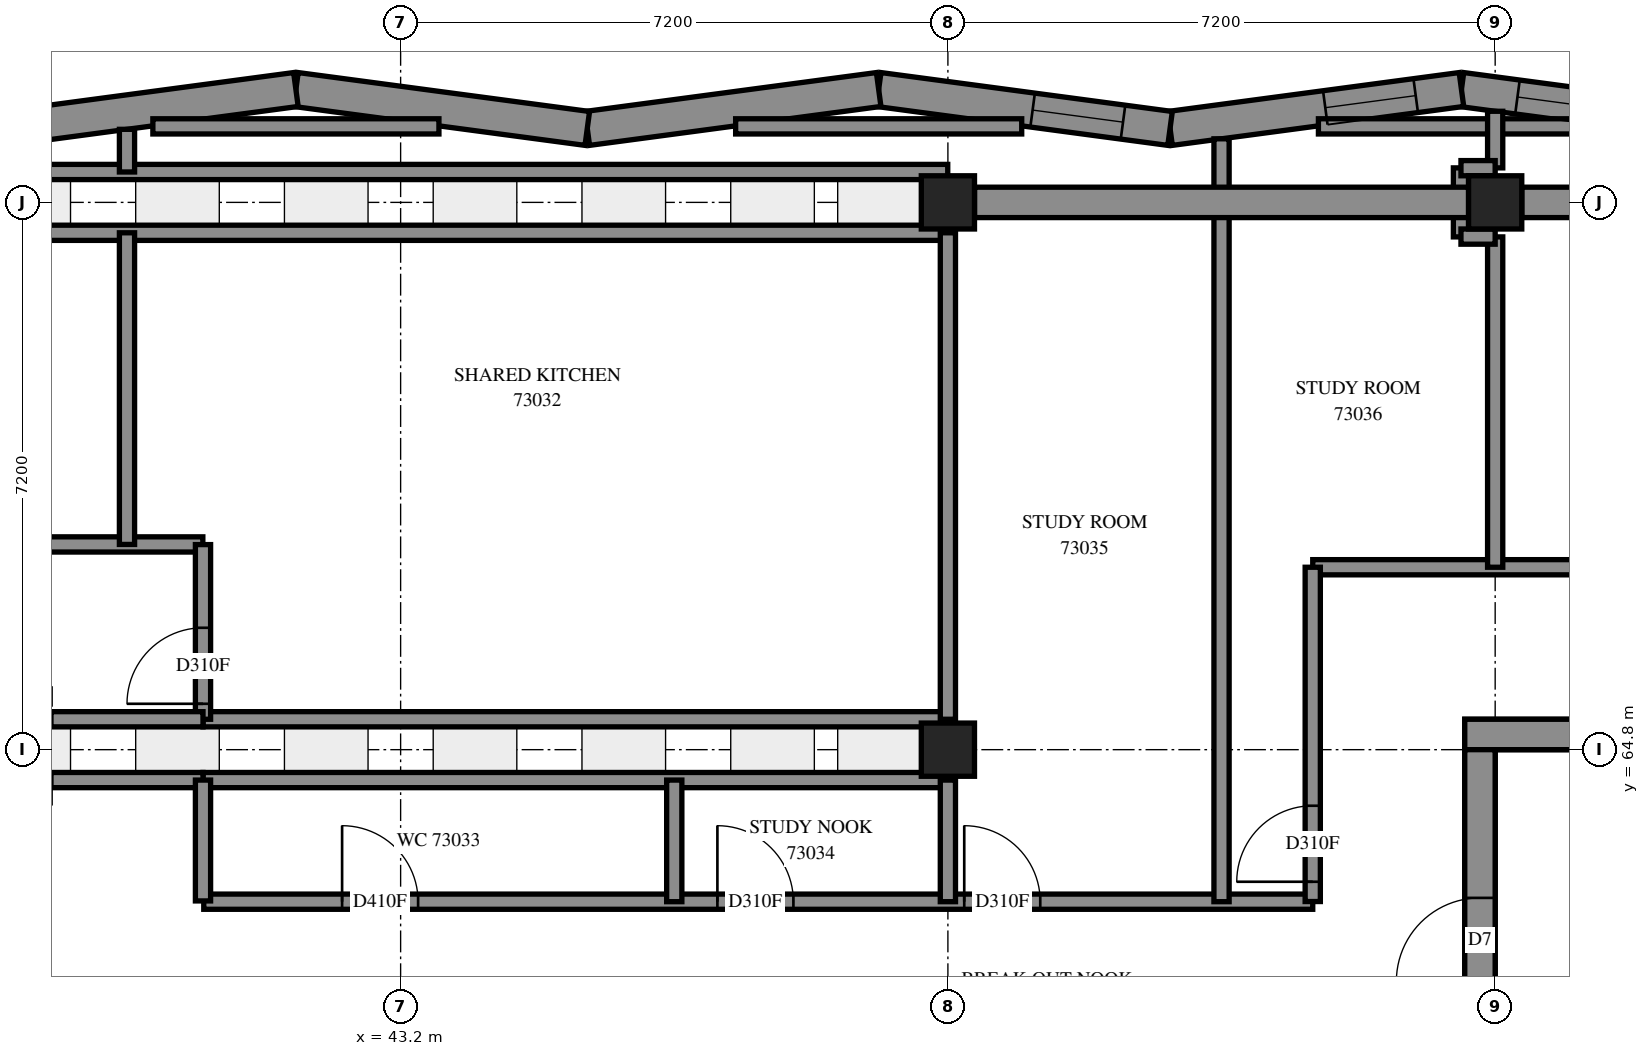
"""IFC4 building model, lengths in metres.
Left out: names, types, materials, properties, quantities, classifications, styles, units other than length and angle.
Written with IfcOpenShell. Run it as: python <this file> out.ifc"""

import sys

from ifc_helpers import new_model, si_unit, direction, frame, frame_2d, origin, origin_2d, place, context, subcontext, project, spatial, polyline, rectangle, outline, extrude, element, fill, save


model = new_model("IFC4")
c1 = context("Model", 3, precision=1e-05, world=origin(), true_north=direction((0.0, 1.0)))
c2 = subcontext(c1, "Body", "Model", "MODEL_VIEW")
j1 = project(units=[si_unit("LENGTHUNIT", "METRE"), si_unit("PLANEANGLEUNIT", "RADIAN")], contexts=[c1])
p1 = place(None, origin())
s1 = spatial("IfcSite", under=j1, at=p1, CompositionType="ELEMENT")
p2 = place(p1, origin())
s2 = spatial("IfcBuilding", under=s1, at=p2, CompositionType="ELEMENT")
p3 = place(p2, frame((0.0, 0.0, 267.6)))
s3 = spatial("IfcBuildingStorey", under=s2, at=p3, CompositionType="ELEMENT", Elevation=267.6)
for number, where, z_axis, x_axis in (
    (1, (50.4, 64.8, 0.0), (0.0, 0.0, 1.0), (1.0, 0.0, 0.0)),
    (2, (50.4, 72.0, 0.0), (0.0, 0.0, 1.0), (1.0, 0.0, 0.0)),
    (3, (57.6, 72.0, 0.0), (0.0, 0.0, 1.0), (1.0, 0.0, 0.0)),
):
    element("IfcColumn", number, at=place(p3, frame(where, z_axis=z_axis, x_axis=x_axis)), inside=s3, PredefinedType="COLUMN", context=c2, shape_type="SweptSolid", body=[
        extrude(rectangle(XDim=0.7, YDim=0.7, at=origin_2d()), origin(), (0.0, 0.0, 1.0), 3.1),
    ])
p4 = place(p3, frame((57.2, 65.0, -0.3), z_axis=(0.0, 0.0, 1.0), x_axis=(1.0, 0.0, 0.0)))
e4 = element("IfcWall", 4, at=p4, inside=s3, PredefinedType="SHEAR", context=c2, shape_type="SweptSolid", body=[
    extrude(rectangle(XDim=15.2, YDim=0.4, at=frame_2d((7.6, 0.0))), origin(), (0.0, 0.0, 1.0), 2.7),
])
p5 = place(p4, frame((10.4, 0.0, 0.3)))
e5 = element("IfcOpeningElement", 5, at=p5, cuts=e4, PredefinedType="OPENING", context=c2, shape_type="SweptSolid", body=[
    extrude(rectangle(XDim=0.8, YDim=2.1, at=frame_2d((0.4, 1.05))), frame((0.0, 0.21, 0.0), z_axis=(0.0, -1.0, 0.0), x_axis=(1.0, 0.0, 0.0)), (0.0, 0.0, 1.0), 0.42),
])
p6 = place(p3, frame((57.4, 50.4, -0.3), z_axis=(0.0, 0.0, 1.0), x_axis=(0.0, 1.0, 0.0)))
e6 = element("IfcWall", 6, at=p6, inside=s3, PredefinedType="SHEAR", context=c2, shape_type="SweptSolid", body=[
    extrude(rectangle(XDim=14.4, YDim=0.4, at=frame_2d((7.2, 0.0))), origin(), (0.0, 0.0, 1.0), 2.7),
])
p7 = place(p6, frame((4.55, 0.0, 0.3)))
e7 = element("IfcOpeningElement", 7, at=p7, cuts=e6, PredefinedType="OPENING", context=c2, shape_type="SweptSolid", body=[
    extrude(rectangle(XDim=1.1, YDim=2.1, at=frame_2d((0.55, 1.05))), frame((0.0, 0.21, 0.0), z_axis=(0.0, -1.0, 0.0), x_axis=(1.0, 0.0, 0.0)), (0.0, 0.0, 1.0), 0.42),
])
p8 = place(p6, frame((11.35, 0.0, 0.3)))
e8 = element("IfcOpeningElement", 8, at=p8, cuts=e6, PredefinedType="OPENING", context=c2, shape_type="SweptSolid", body=[
    extrude(rectangle(XDim=1.1, YDim=2.1, at=frame_2d((0.55, 1.05))), frame((0.0, 0.21, 0.0), z_axis=(0.0, -1.0, 0.0), x_axis=(1.0, 0.0, 0.0)), (0.0, 0.0, 1.0), 0.42),
])
p9 = place(p3, frame((60.99, 72.973, 0.0), z_axis=(0.0, 0.0, 1.0), x_axis=(-0.9911989729, 0.1323804972, 0.0)))
e9 = element("IfcWall", 9, at=p9, inside=s3, PredefinedType="SOLIDWALL", context=c2, shape_type="SweptSolid", body=[
    extrude(outline(polyline([(0.03, -0.225), (3.898, -0.225), (3.837, 0.225), (-0.03, 0.225), (0.03, -0.225)])), origin(), (0.0, 0.0, 1.0), 3.1),
])
p10 = place(p9, frame((0.474, 0.0, 0.45)))
e10 = element("IfcOpeningElement", 10, at=p10, cuts=e9, PredefinedType="OPENING", context=c2, shape_type="SweptSolid", body=[
    extrude(rectangle(XDim=1.3, YDim=2.5, at=frame_2d((0.65, 1.25))), frame((0.0, 0.235, 0.0), z_axis=(0.0, -1.0, 0.0), x_axis=(1.0, 0.0, 0.0)), (0.0, 0.0, 1.0), 0.47),
])
p11 = place(p9, frame((2.124, 0.0, 0.45)))
e11 = element("IfcOpeningElement", 11, at=p11, cuts=e9, PredefinedType="OPENING", context=c2, shape_type="SweptSolid", body=[
    extrude(rectangle(XDim=1.0, YDim=2.5, at=frame_2d((0.5, 1.25))), frame((0.0, 0.235, 0.0), z_axis=(0.0, -1.0, 0.0), x_axis=(1.0, 0.0, 0.0)), (0.0, 0.0, 1.0), 0.47),
])
p12 = place(p3, frame((57.156, 73.485, 0.0), z_axis=(0.0, 0.0, 1.0), x_axis=(-0.9911985198, -0.13238389, 0.0)))
e12 = element("IfcWall", 12, at=p12, inside=s3, PredefinedType="SOLIDWALL", context=c2, shape_type="SweptSolid", body=[
    extrude(outline(polyline([(-0.03, -0.225), (3.837, -0.225), (3.898, 0.225), (0.03, 0.225), (-0.03, -0.225)])), origin(), (0.0, 0.0, 1.0), 3.1),
])
p13 = place(p12, frame((0.607, 0.0, 0.45)))
e13 = element("IfcOpeningElement", 13, at=p13, cuts=e12, PredefinedType="OPENING", context=c2, shape_type="SweptSolid", body=[
    extrude(rectangle(XDim=1.2, YDim=2.55, at=frame_2d((0.6, 1.275))), frame((0.0, 0.235, 0.0), z_axis=(0.0, -1.0, 0.0), x_axis=(1.0, 0.0, 0.0)), (0.0, 0.0, 1.0), 0.47),
])
p14 = place(p3, frame((53.323, 72.973, 0.0), z_axis=(0.0, 0.0, 1.0), x_axis=(-0.9911989729, 0.1323804972, 0.0)))
e14 = element("IfcWall", 14, at=p14, inside=s3, PredefinedType="SOLIDWALL", context=c2, shape_type="SweptSolid", body=[
    extrude(outline(polyline([(0.03, -0.225), (3.898, -0.225), (3.837, 0.225), (-0.03, 0.225), (0.03, -0.225)])), origin(), (0.0, 0.0, 1.0), 3.1),
])
p15 = place(p14, frame((0.624, 0.0, 0.45)))
e15 = element("IfcOpeningElement", 15, at=p15, cuts=e14, PredefinedType="OPENING", context=c2, shape_type="SweptSolid", body=[
    extrude(rectangle(XDim=1.2, YDim=2.55, at=frame_2d((0.6, 1.275))), frame((0.0, 0.235, 0.0), z_axis=(0.0, -1.0, 0.0), x_axis=(1.0, 0.0, 0.0)), (0.0, 0.0, 1.0), 0.47),
])
p16 = place(p3, frame((49.489, 73.485, 0.0), z_axis=(0.0, 0.0, 1.0), x_axis=(-0.9911985198, -0.13238389, 0.0)))
e16 = element("IfcWall", 16, at=p16, inside=s3, PredefinedType="SOLIDWALL", context=c2, shape_type="SweptSolid", body=[
    extrude(outline(polyline([(-0.03, -0.225), (3.837, -0.225), (3.898, 0.225), (0.03, 0.225), (-0.03, -0.225)])), origin(), (0.0, 0.0, 1.0), 3.1),
])
p17 = place(p3, frame((45.656, 72.973, 0.0), z_axis=(0.0, 0.0, 1.0), x_axis=(-0.9911989729, 0.1323804972, 0.0)))
e17 = element("IfcWall", 17, at=p17, inside=s3, PredefinedType="SOLIDWALL", context=c2, shape_type="SweptSolid", body=[
    extrude(outline(polyline([(0.03, -0.225), (3.898, -0.225), (3.837, 0.225), (-0.03, 0.225), (0.03, -0.225)])), origin(), (0.0, 0.0, 1.0), 3.1),
])
p18 = place(p3, frame((41.822, 73.485, 0.0), z_axis=(0.0, 0.0, 1.0), x_axis=(-0.9911985198, -0.13238389, 0.0)))
e18 = element("IfcWall", 18, at=p18, inside=s3, PredefinedType="SOLIDWALL", context=c2, shape_type="SweptSolid", body=[
    extrude(outline(polyline([(-0.03, -0.225), (3.837, -0.225), (3.898, 0.225), (0.03, 0.225), (-0.03, -0.225)])), origin(), (0.0, 0.0, 1.0), 3.1),
])
p19 = place(p3, frame((55.2, 67.2, 0.0), z_axis=(0.0, 0.0, 1.0), x_axis=(1.0, 0.0, 0.0)))
e19 = element("IfcWall", 19, at=p19, inside=s3, PredefinedType="PARTITIONING", context=c2, shape_type="SweptSolid", body=[
    extrude(rectangle(XDim=19.2, YDim=0.2, at=frame_2d((9.6, 0.0))), origin(), (0.0, 0.0, 1.0), 3.1),
])
p20 = place(p19, frame((4.32, 0.0, 0.0)))
e20 = element("IfcOpeningElement", 20, at=p20, cuts=e19, PredefinedType="OPENING", context=c2, shape_type="SweptSolid", body=[
    extrude(rectangle(XDim=1.0, YDim=2.1, at=frame_2d((0.5, 1.05))), frame((0.0, 0.11, 0.0), z_axis=(0.0, -1.0, 0.0), x_axis=(1.0, 0.0, 0.0)), (0.0, 0.0, 1.0), 0.22),
])
p21 = place(p19, frame((8.338, 0.0, 0.0)))
e21 = element("IfcOpeningElement", 21, at=p21, cuts=e19, PredefinedType="OPENING", context=c2, shape_type="SweptSolid", body=[
    extrude(rectangle(XDim=1.0, YDim=2.1, at=frame_2d((0.5, 1.05))), frame((0.0, 0.11, 0.0), z_axis=(0.0, -1.0, 0.0), x_axis=(1.0, 0.0, 0.0)), (0.0, 0.0, 1.0), 0.22),
])
p22 = place(p19, frame((13.768, 0.0, 0.0)))
e22 = element("IfcOpeningElement", 22, at=p22, cuts=e19, PredefinedType="OPENING", context=c2, shape_type="SweptSolid", body=[
    extrude(rectangle(XDim=1.0, YDim=2.1, at=frame_2d((0.5, 1.05))), frame((0.0, 0.11, 0.0), z_axis=(0.0, -1.0, 0.0), x_axis=(1.0, 0.0, 0.0)), (0.0, 0.0, 1.0), 0.22),
])
p23 = place(p3, frame((40.61, 62.8, 0.0), z_axis=(0.0, 0.0, 1.0), x_axis=(1.0, 0.0, 0.0)))
e23 = element("IfcWall", 23, at=p23, inside=s3, PredefinedType="PARTITIONING", context=c2, shape_type="SweptSolid", body=[
    extrude(rectangle(XDim=14.59, YDim=0.2, at=frame_2d((7.295, 0.0))), origin(), (0.0, 0.0, 1.0), 3.1),
])
p24 = place(p23, frame((1.82, 0.0, 0.0)))
e24 = element("IfcOpeningElement", 24, at=p24, cuts=e23, PredefinedType="OPENING", context=c2, shape_type="SweptSolid", body=[
    extrude(rectangle(XDim=1.0, YDim=2.1, at=frame_2d((0.5, 1.05))), frame((0.0, 0.11, 0.0), z_axis=(0.0, -1.0, 0.0), x_axis=(1.0, 0.0, 0.0)), (0.0, 0.0, 1.0), 0.22),
])
p25 = place(p23, frame((6.758, 0.0, 0.0)))
e25 = element("IfcOpeningElement", 25, at=p25, cuts=e23, PredefinedType="OPENING", context=c2, shape_type="SweptSolid", body=[
    extrude(rectangle(XDim=1.0, YDim=2.1, at=frame_2d((0.5, 1.05))), frame((0.0, 0.11, 0.0), z_axis=(0.0, -1.0, 0.0), x_axis=(1.0, 0.0, 0.0)), (0.0, 0.0, 1.0), 0.22),
])
p26 = place(p23, frame((10.005, 0.0, 0.0)))
e26 = element("IfcOpeningElement", 26, at=p26, cuts=e23, PredefinedType="OPENING", context=c2, shape_type="SweptSolid", body=[
    extrude(rectangle(XDim=1.0, YDim=2.1, at=frame_2d((0.5, 1.05))), frame((0.0, 0.11, 0.0), z_axis=(0.0, -1.0, 0.0), x_axis=(1.0, 0.0, 0.0)), (0.0, 0.0, 1.0), 0.22),
])
p27 = place(p3, frame((36.002, 71.6, 0.0), z_axis=(0.0, 0.0, 1.0), x_axis=(1.0, 0.0, 0.0)))
e27 = element("IfcWall", 27, at=p27, inside=s3, PredefinedType="PARTITIONING", context=c2, shape_type="SweptSolid", body=[
    extrude(rectangle(XDim=14.398, YDim=0.2, at=frame_2d((7.199, 0.0))), origin(), (0.0, 0.0, 1.0), 3.1),
])
p28 = place(p3, frame((36.002, 72.4, 0.0), z_axis=(0.0, 0.0, 1.0), x_axis=(1.0, 0.0, 0.0)))
e28 = element("IfcWall", 28, at=p28, inside=s3, PredefinedType="PARTITIONING", context=c2, shape_type="SweptSolid", body=[
    extrude(rectangle(XDim=14.396, YDim=0.2, at=frame_2d((7.198, 0.0))), origin(), (0.0, 0.0, 1.0), 3.1),
])
p29 = place(p3, frame((54.0, 62.8, 0.0), z_axis=(0.0, 0.0, 1.0), x_axis=(0.0, 1.0, 0.0)))
e29 = element("IfcWall", 29, at=p29, inside=s3, PredefinedType="PARTITIONING", context=c2, shape_type="SweptSolid", body=[
    extrude(rectangle(XDim=10.036, YDim=0.2, at=frame_2d((5.018, 0.0))), origin(), (0.0, 0.0, 1.0), 3.1),
])
for number, where, z_axis, x_axis in (
    (30, (40.6, 64.4, 0.0), (0.0, 0.0, 1.0), (1.0, 0.0, 0.0)),
    (31, (40.6, 65.2, 0.0), (0.0, 0.0, 1.0), (1.0, 0.0, 0.0)),
):
    element("IfcWall", number, at=place(p3, frame(where, z_axis=z_axis, x_axis=x_axis)), inside=s3, PredefinedType="PARTITIONING", context=c2, shape_type="SweptSolid", body=[
        extrude(rectangle(XDim=9.8, YDim=0.2, at=frame_2d((4.9, 0.0))), origin(), (0.0, 0.0, 1.0), 3.1),
    ])
p30 = place(p3, frame((50.4, 65.2, 0.0), z_axis=(0.0, 0.0, 1.0), x_axis=(0.0, 1.0, 0.0)))
e32 = element("IfcWall", 32, at=p30, inside=s3, PredefinedType="PARTITIONING", context=c2, shape_type="SweptSolid", body=[
    extrude(rectangle(XDim=6.4, YDim=0.2, at=frame_2d((3.2, 0.0))), origin(), (0.0, 0.0, 1.0), 3.1),
])
p31 = place(p3, frame((35.246, 67.5, 0.0), z_axis=(0.0, 0.0, 1.0), x_axis=(1.0, 0.0, 0.0)))
e33 = element("IfcWall", 33, at=p31, inside=s3, PredefinedType="PARTITIONING", context=c2, shape_type="SweptSolid", body=[
    extrude(rectangle(XDim=5.352, YDim=0.2, at=frame_2d((2.676, 0.0))), origin(), (0.0, 0.0, 1.0), 3.1),
])
p32 = place(p31, frame((0.254, 0.0, 0.0)))
e34 = element("IfcOpeningElement", 34, at=p32, cuts=e33, PredefinedType="OPENING", context=c2, shape_type="SweptSolid", body=[
    extrude(rectangle(XDim=1.0, YDim=2.1, at=frame_2d((0.5, 1.05))), frame((0.0, 0.11, 0.0), z_axis=(0.0, -1.0, 0.0), x_axis=(1.0, 0.0, 0.0)), (0.0, 0.0, 1.0), 0.22),
])
p33 = place(p3, frame((55.2, 62.802, 0.0), z_axis=(0.0, 0.0, 1.0), x_axis=(0.0, 1.0, 0.0)))
e35 = element("IfcWall", 35, at=p33, inside=s3, PredefinedType="PARTITIONING", context=c2, shape_type="SweptSolid", body=[
    extrude(rectangle(XDim=4.398, YDim=0.2, at=frame_2d((2.199, 0.0))), origin(), (0.0, 0.0, 1.0), 3.1),
])
p34 = place(p33, frame((0.26, 0.0, 0.0)))
e36 = element("IfcOpeningElement", 36, at=p34, cuts=e35, PredefinedType="OPENING", context=c2, shape_type="SweptSolid", body=[
    extrude(rectangle(XDim=1.0, YDim=2.1, at=frame_2d((0.5, 1.05))), frame((0.0, 0.11, 0.0), z_axis=(0.0, -1.0, 0.0), x_axis=(1.0, 0.0, 0.0)), (0.0, 0.0, 1.0), 0.22),
])
p35 = place(p3, frame((57.6, 67.2, 0.0), z_axis=(0.0, 0.0, 1.0), x_axis=(0.0, 1.0, 0.0)))
e37 = element("IfcWall", 37, at=p35, inside=s3, PredefinedType="PARTITIONING", context=c2, shape_type="SweptSolid", body=[
    extrude(rectangle(XDim=4.346, YDim=0.2, at=frame_2d((2.173, 0.0))), origin(), (0.0, 0.0, 1.0), 3.1),
])
p36 = place(p3, frame((39.6, 67.5, 0.0), z_axis=(0.0, 0.0, 1.0), x_axis=(0.0, 1.0, 0.0)))
e38 = element("IfcWall", 38, at=p36, inside=s3, PredefinedType="PARTITIONING", context=c2, shape_type="SweptSolid", body=[
    extrude(rectangle(XDim=4.1, YDim=0.2, at=frame_2d((2.05, 0.0))), origin(), (0.0, 0.0, 1.0), 3.1),
])
for number, where, z_axis, x_axis in (
    (39, (39.94, 73.0, 0.0), (0.0, 0.0, 1.0), (1.0, 0.0, 0.0)),
    (40, (47.608, 73.0, 0.0), (0.0, 0.0, 1.0), (1.0, 0.0, 0.0)),
    (41, (55.275, 73.0, 0.0), (0.0, 0.0, 1.0), (1.0, 0.0, 0.0)),
):
    element("IfcWall", number, at=place(p3, frame(where, z_axis=z_axis, x_axis=x_axis)), inside=s3, PredefinedType="PARTITIONING", context=c2, shape_type="SweptSolid", body=[
        extrude(rectangle(XDim=3.764, YDim=0.2, at=frame_2d((1.882, 0.0))), origin(), (0.0, 0.0, 1.0), 3.1),
    ])
p37 = place(p3, frame((40.6, 65.2, 0.0), z_axis=(0.0, 0.0, 1.0), x_axis=(0.0, 1.0, 0.0)))
e42 = element("IfcWall", 42, at=p37, inside=s3, PredefinedType="PARTITIONING", context=c2, shape_type="SweptSolid", body=[
    extrude(rectangle(XDim=2.298, YDim=0.2, at=frame_2d((1.149, 0.0))), origin(), (0.0, 0.0, 1.0), 3.1),
])
p38 = place(p37, frame((0.203, 0.0, 0.0)))
e43 = element("IfcOpeningElement", 43, at=p38, cuts=e42, PredefinedType="OPENING", context=c2, shape_type="SweptSolid", body=[
    extrude(rectangle(XDim=1.0, YDim=2.1, at=frame_2d((0.5, 1.05))), frame((0.0, 0.11, 0.0), z_axis=(0.0, -1.0, 0.0), x_axis=(1.0, 0.0, 0.0)), (0.0, 0.0, 1.0), 0.22),
])
for number, where, z_axis, x_axis in (
    (44, (38.6, 64.4, 0.0), (0.0, 0.0, 1.0), (1.0, 0.0, 0.0)),
    (45, (38.6, 65.2, 0.0), (0.0, 0.0, 1.0), (1.0, 0.0, 0.0)),
):
    element("IfcWall", number, at=place(p3, frame(where, z_axis=z_axis, x_axis=x_axis)), inside=s3, PredefinedType="PARTITIONING", context=c2, shape_type="SweptSolid", body=[
        extrude(rectangle(XDim=2.0, YDim=0.2, at=frame_2d((1.0, 0.0))), origin(), (0.0, 0.0, 1.0), 3.1),
    ])
for number, where, z_axis, x_axis in (
    (46, (46.8, 62.8, 0.0), (0.0, 0.0, 1.0), (0.0, 1.0, 0.0)),
    (47, (50.4, 62.8, 0.0), (0.0, 0.0, 1.0), (0.0, 1.0, 0.0)),
):
    element("IfcWall", number, at=place(p3, frame(where, z_axis=z_axis, x_axis=x_axis)), inside=s3, PredefinedType="PARTITIONING", context=c2, shape_type="SweptSolid", body=[
        extrude(rectangle(XDim=1.6, YDim=0.2, at=frame_2d((0.8, 0.0))), origin(), (0.0, 0.0, 1.0), 3.1),
    ])
p39 = place(p3, frame((40.6, 62.81, 0.0), z_axis=(0.0, 0.0, 1.0), x_axis=(0.0, 1.0, 0.0)))
e48 = element("IfcWall", 48, at=p39, inside=s3, PredefinedType="PARTITIONING", context=c2, shape_type="SweptSolid", body=[
    extrude(rectangle(XDim=1.59, YDim=0.2, at=frame_2d((0.795, 0.0))), origin(), (0.0, 0.0, 1.0), 3.1),
])
p40 = place(p3, frame((57.15, 71.546, 0.0), z_axis=(0.0, 0.0, 1.0), x_axis=(0.0, 1.0, 0.0)))
e49 = element("IfcWall", 49, at=p40, inside=s3, PredefinedType="PARTITIONING", context=c2, shape_type="SweptSolid", body=[
    extrude(rectangle(XDim=0.908, YDim=0.2, at=frame_2d((0.454, 0.0))), origin(), (0.0, 0.0, 1.0), 3.1),
])
p41 = place(p3, frame((57.6, 72.454, 0.0), z_axis=(0.0, 0.0, 1.0), x_axis=(0.0, 1.0, 0.0)))
e50 = element("IfcWall", 50, at=p41, inside=s3, PredefinedType="PARTITIONING", context=c2, shape_type="SweptSolid", body=[
    extrude(rectangle(XDim=0.745, YDim=0.2, at=frame_2d((0.372, 0.0))), origin(), (0.0, 0.0, 1.0), 3.1),
])
p42 = place(p3, frame((39.6, 72.4, 0.0), z_axis=(0.0, 0.0, 1.0), x_axis=(0.0, 1.0, 0.0)))
e51 = element("IfcWall", 51, at=p42, inside=s3, PredefinedType="PARTITIONING", context=c2, shape_type="SweptSolid", body=[
    extrude(rectangle(XDim=0.561, YDim=0.2, at=frame_2d((0.281, 0.0))), origin(), (0.0, 0.0, 1.0), 3.1),
])
for number, where, z_axis, x_axis in (
    (52, (57.15, 72.45, 0.0), (0.0, 0.0, 1.0), (1.0, 0.0, 0.0)),
    (53, (57.15, 71.55, 0.0), (0.0, 0.0, 1.0), (1.0, 0.0, 0.0)),
):
    element("IfcWall", number, at=place(p3, frame(where, z_axis=z_axis, x_axis=x_axis)), inside=s3, PredefinedType="PARTITIONING", context=c2, shape_type="SweptSolid", body=[
        extrude(rectangle(XDim=0.45, YDim=0.2, at=frame_2d((0.225, 0.0))), origin(), (0.0, 0.0, 1.0), 3.1),
    ])
p43 = place(p13, origin())
e54 = element("IfcWindow", 54, at=p43, inside=s3, PartitioningType="SINGLE_PANEL", PredefinedType="WINDOW", context=c2, shape_type="SweptSolid", body=[
    extrude(rectangle(XDim=1.2, YDim=2.55, at=frame_2d((0.6, 1.275))), frame((0.0, 0.115, 0.0), z_axis=(0.0, -1.0, 0.0), x_axis=(1.0, 0.0, 0.0)), (0.0, 0.0, 1.0), 0.06),
])
fill(e13, e54)
p44 = place(p15, origin())
e55 = element("IfcWindow", 55, at=p44, inside=s3, PartitioningType="SINGLE_PANEL", PredefinedType="WINDOW", context=c2, shape_type="SweptSolid", body=[
    extrude(rectangle(XDim=1.2, YDim=2.55, at=frame_2d((0.6, 1.275))), frame((0.0, 0.205, 0.0), z_axis=(0.0, -1.0, 0.0), x_axis=(1.0, 0.0, 0.0)), (0.0, 0.0, 1.0), 0.06),
])
fill(e15, e55)
p45 = place(p8, origin())
e56 = element("IfcDoor", 56, at=p45, inside=s3, OperationType="SINGLE_SWING_LEFT", PredefinedType="DOOR", context=c2, shape_type="SweptSolid", body=[
    extrude(rectangle(XDim=1.1, YDim=2.1, at=frame_2d((0.55, 1.05))), frame((0.0, 0.025, 0.0), z_axis=(0.0, -1.0, 0.0), x_axis=(1.0, 0.0, 0.0)), (0.0, 0.0, 1.0), 0.05),
])
fill(e8, e56)
p46 = place(p38, origin())
e57 = element("IfcDoor", 57, at=p46, inside=s3, OperationType="SINGLE_SWING_LEFT", PredefinedType="DOOR", context=c2, shape_type="SweptSolid", body=[
    extrude(rectangle(XDim=1.0, YDim=2.1, at=frame_2d((0.5, 1.05))), frame((0.0, 0.025, 0.0), z_axis=(0.0, -1.0, 0.0), x_axis=(1.0, 0.0, 0.0)), (0.0, 0.0, 1.0), 0.05),
])
fill(e43, e57)
p47 = place(p24, origin())
e58 = element("IfcDoor", 58, at=p47, inside=s3, OperationType="SINGLE_SWING_LEFT", PredefinedType="DOOR", context=c2, shape_type="SweptSolid", body=[
    extrude(rectangle(XDim=1.0, YDim=2.1, at=frame_2d((0.5, 1.05))), frame((0.0, 0.025, 0.0), z_axis=(0.0, -1.0, 0.0), x_axis=(1.0, 0.0, 0.0)), (0.0, 0.0, 1.0), 0.05),
])
fill(e24, e58)
p48 = place(p25, origin())
e59 = element("IfcDoor", 59, at=p48, inside=s3, OperationType="SINGLE_SWING_LEFT", PredefinedType="DOOR", context=c2, shape_type="SweptSolid", body=[
    extrude(rectangle(XDim=1.0, YDim=2.1, at=frame_2d((0.5, 1.05))), frame((0.0, 0.025, 0.0), z_axis=(0.0, -1.0, 0.0), x_axis=(1.0, 0.0, 0.0)), (0.0, 0.0, 1.0), 0.05),
])
fill(e25, e59)
p49 = place(p26, origin())
e60 = element("IfcDoor", 60, at=p49, inside=s3, OperationType="SINGLE_SWING_LEFT", PredefinedType="DOOR", context=c2, shape_type="SweptSolid", body=[
    extrude(rectangle(XDim=1.0, YDim=2.1, at=frame_2d((0.5, 1.05))), frame((0.0, 0.025, 0.0), z_axis=(0.0, -1.0, 0.0), x_axis=(1.0, 0.0, 0.0)), (0.0, 0.0, 1.0), 0.05),
])
fill(e26, e60)
p50 = place(p34, origin())
e61 = element("IfcDoor", 61, at=p50, inside=s3, OperationType="SINGLE_SWING_LEFT", PredefinedType="DOOR", context=c2, shape_type="SweptSolid", body=[
    extrude(rectangle(XDim=1.0, YDim=2.1, at=frame_2d((0.5, 1.05))), frame((0.0, 0.025, 0.0), z_axis=(0.0, -1.0, 0.0), x_axis=(1.0, 0.0, 0.0)), (0.0, 0.0, 1.0), 0.05),
])
fill(e36, e61)
p51 = place(p11, origin())
e62 = element("IfcWindow", 62, at=p51, inside=s3, PartitioningType="SINGLE_PANEL", PredefinedType="WINDOW", context=c2, shape_type="SweptSolid", body=[
    extrude(rectangle(XDim=1.0, YDim=2.5, at=frame_2d((0.5, 1.25))), frame((0.0, 0.125, 0.0), z_axis=(0.0, -1.0, 0.0), x_axis=(1.0, 0.0, 0.0)), (0.0, 0.0, 1.0), 0.06),
])
fill(e11, e62)
save(model, sys.argv[1])
